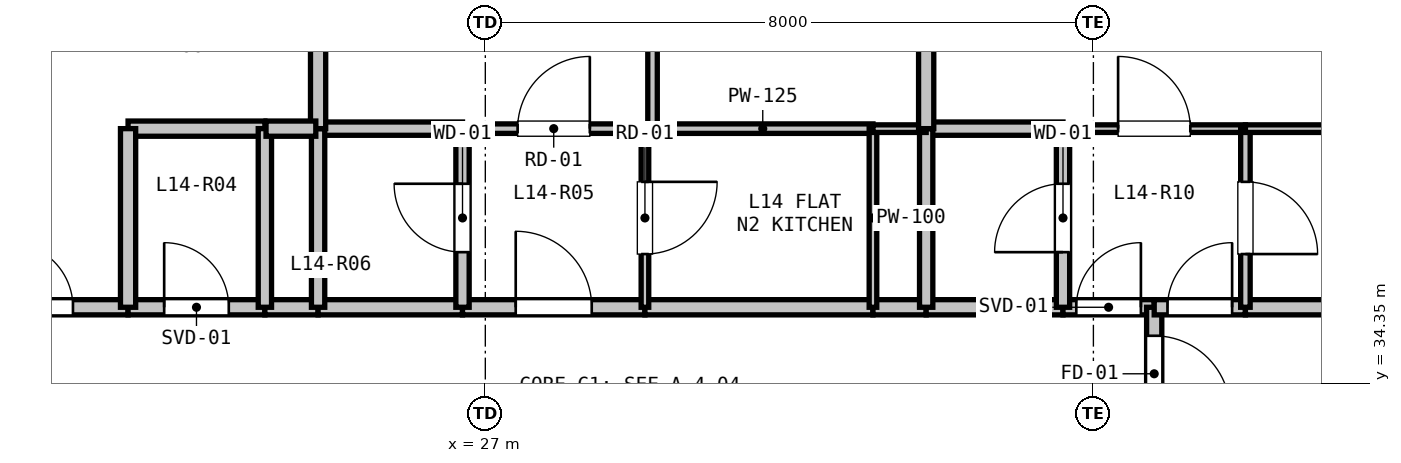
"""IFC4 building model, lengths in metres.
Left out: names, types, materials, properties, quantities, classifications, styles, units other than length and angle.
Written with IfcOpenShell. Run it as: python <this file> out.ifc"""

import sys

from ifc_helpers import new_model, si_unit, direction, frame, frame_2d, origin, place, context, subcontext, project, spatial, rectangle, extrude, element, fill, save


model = new_model("IFC4")
c1 = context("Model", 3, precision=1e-05, world=origin(), true_north=direction((0.0, 1.0)))
c2 = subcontext(c1, "Body", "Model", "MODEL_VIEW")
j1 = project(units=[si_unit("LENGTHUNIT", "METRE"), si_unit("PLANEANGLEUNIT", "RADIAN")], contexts=[c1])
p1 = place(None, origin())
s1 = spatial("IfcSite", under=j1, at=p1, CompositionType="ELEMENT")
p2 = place(p1, origin())
s2 = spatial("IfcBuilding", under=s1, at=p2, CompositionType="ELEMENT")
p3 = place(p2, frame((0.0, 0.0, 52.2)))
s3 = spatial("IfcBuildingStorey", under=s2, at=p3, CompositionType="ELEMENT", Elevation=52.2)
p4 = place(p3, frame((16.39, 36.617, 0.0), z_axis=(0.0, 0.0, 1.0), x_axis=(0.866027351828, 0.499996625875, 0.0)))
e1 = element("IfcWall", 1, at=p4, inside=s3, PredefinedType="PARAPET", context=c2, shape_type="SweptSolid", body=[
    extrude(rectangle(XDim=11.973, YDim=0.2, at=frame_2d((5.987, 0.0))), origin(), (0.0, 0.0, 1.0), 0.2),
])
p5 = place(p3, frame((20.0, 35.35, 0.0), z_axis=(0.0, 0.0, 1.0), x_axis=(1.0, 0.0, 0.0)))
e2 = element("IfcWall", 2, at=p5, inside=s3, PredefinedType="PARTITIONING", context=c2, shape_type="SweptSolid", body=[
    extrude(rectangle(XDim=2.3, YDim=0.2, at=frame_2d((1.15, 0.0))), origin(), (0.0, 0.0, 1.0), 3.04),
])
p6 = place(p5, frame((0.725, 0.0, 0.0)))
e3 = element("IfcOpeningElement", 3, at=p6, cuts=e2, PredefinedType="OPENING", context=c2, shape_type="SweptSolid", body=[
    extrude(rectangle(XDim=0.85, YDim=2.1, at=frame_2d((0.425, 1.05))), frame((0.0, 0.11, 0.0), z_axis=(0.0, -1.0, 0.0), x_axis=(1.0, 0.0, 0.0)), (0.0, 0.0, 1.0), 0.22),
])
p7 = place(p3, frame((22.3, 35.35, 0.0), z_axis=(0.0, 0.0, 1.0), x_axis=(1.0, 0.0, 0.0)))
e4 = element("IfcWall", 4, at=p7, inside=s3, PredefinedType="PARTITIONING", context=c2, shape_type="SweptSolid", body=[
    extrude(rectangle(XDim=1.8, YDim=0.2, at=frame_2d((0.9, 0.0))), origin(), (0.0, 0.0, 1.0), 3.04),
])
p8 = place(p7, frame((0.475, 0.0, 0.0)))
e5 = element("IfcOpeningElement", 5, at=p8, cuts=e4, PredefinedType="OPENING", context=c2, shape_type="SweptSolid", body=[
    extrude(rectangle(XDim=0.85, YDim=2.1, at=frame_2d((0.425, 1.05))), frame((0.0, 0.11, 0.0), z_axis=(0.0, -1.0, 0.0), x_axis=(1.0, 0.0, 0.0)), (0.0, 0.0, 1.0), 0.22),
])
p9 = place(p3, frame((24.1, 35.35, 0.0), z_axis=(0.0, 0.0, 1.0), x_axis=(1.0, 0.0, 0.0)))
e6 = element("IfcWall", 6, at=p9, inside=s3, PredefinedType="PARTITIONING", context=c2, shape_type="SweptSolid", body=[
    extrude(rectangle(XDim=0.7, YDim=0.2, at=frame_2d((0.35, 0.0))), origin(), (0.0, 0.0, 1.0), 3.04),
])
p10 = place(p3, frame((24.8, 35.35, 0.0), z_axis=(0.0, 0.0, 1.0), x_axis=(1.0, 0.0, 0.0)))
e7 = element("IfcWall", 7, at=p10, inside=s3, PredefinedType="PARTITIONING", context=c2, shape_type="SweptSolid", body=[
    extrude(rectangle(XDim=1.9, YDim=0.2, at=frame_2d((0.95, 0.0))), origin(), (0.0, 0.0, 1.0), 3.04),
])
p11 = place(p3, frame((26.7, 35.35, 0.0), z_axis=(0.0, 0.0, 1.0), x_axis=(1.0, 0.0, 0.0)))
e8 = element("IfcWall", 8, at=p11, inside=s3, PredefinedType="PARTITIONING", context=c2, shape_type="SweptSolid", body=[
    extrude(rectangle(XDim=2.4, YDim=0.2, at=frame_2d((1.2, 0.0))), origin(), (0.0, 0.0, 1.0), 3.04),
])
p12 = place(p11, frame((0.7, 0.0, 0.0)))
e9 = element("IfcOpeningElement", 9, at=p12, cuts=e8, PredefinedType="OPENING", context=c2, shape_type="SweptSolid", body=[
    extrude(rectangle(XDim=1.0, YDim=2.15, at=frame_2d((0.5, 1.075))), frame((0.0, 0.11, 0.0), z_axis=(0.0, -1.0, 0.0), x_axis=(1.0, 0.0, 0.0)), (0.0, 0.0, 1.0), 0.22),
])
p13 = place(p3, frame((29.1, 35.35, 0.0), z_axis=(0.0, 0.0, 1.0), x_axis=(1.0, 0.0, 0.0)))
e10 = element("IfcWall", 10, at=p13, inside=s3, PredefinedType="PARTITIONING", context=c2, shape_type="SweptSolid", body=[
    extrude(rectangle(XDim=3.0, YDim=0.2, at=frame_2d((1.5, 0.0))), origin(), (0.0, 0.0, 1.0), 3.04),
])
p14 = place(p3, frame((32.1, 35.35, 0.0), z_axis=(0.0, 0.0, 1.0), x_axis=(1.0, 0.0, 0.0)))
e11 = element("IfcWall", 11, at=p14, inside=s3, PredefinedType="PARTITIONING", context=c2, shape_type="SweptSolid", body=[
    extrude(rectangle(XDim=0.7, YDim=0.2, at=frame_2d((0.35, 0.0))), origin(), (0.0, 0.0, 1.0), 3.04),
])
p15 = place(p3, frame((32.8, 35.35, 0.0), z_axis=(0.0, 0.0, 1.0), x_axis=(1.0, 0.0, 0.0)))
e12 = element("IfcWall", 12, at=p15, inside=s3, PredefinedType="PARTITIONING", context=c2, shape_type="SweptSolid", body=[
    extrude(rectangle(XDim=1.8, YDim=0.2, at=frame_2d((0.9, 0.0))), origin(), (0.0, 0.0, 1.0), 3.04),
])
p16 = place(p3, frame((34.6, 35.35, 0.0), z_axis=(0.0, 0.0, 1.0), x_axis=(1.0, 0.0, 0.0)))
e13 = element("IfcWall", 13, at=p16, inside=s3, PredefinedType="PARTITIONING", context=c2, shape_type="SweptSolid", body=[
    extrude(rectangle(XDim=1.2, YDim=0.2, at=frame_2d((0.6, 0.0))), origin(), (0.0, 0.0, 1.0), 3.04),
])
p17 = place(p16, frame((0.175, 0.0, 0.0)))
e14 = element("IfcOpeningElement", 14, at=p17, cuts=e13, PredefinedType="OPENING", context=c2, shape_type="SweptSolid", body=[
    extrude(rectangle(XDim=0.85, YDim=2.1, at=frame_2d((0.425, 1.05))), frame((0.0, 0.11, 0.0), z_axis=(0.0, -1.0, 0.0), x_axis=(1.0, 0.0, 0.0)), (0.0, 0.0, 1.0), 0.22),
])
p18 = place(p3, frame((35.8, 35.35, 0.0), z_axis=(0.0, 0.0, 1.0), x_axis=(0.0, -1.0, 0.0)))
e15 = element("IfcWall", 15, at=p18, inside=s3, PredefinedType="PARTITIONING", context=c2, shape_type="SweptSolid", body=[
    extrude(rectangle(XDim=1.75, YDim=0.2, at=frame_2d((0.875, 0.0))), origin(), (0.0, 0.0, 1.0), 3.04),
])
p19 = place(p18, frame((0.375, 0.0, 0.0)))
e16 = element("IfcOpeningElement", 16, at=p19, cuts=e15, PredefinedType="OPENING", context=c2, shape_type="SweptSolid", body=[
    extrude(rectangle(XDim=1.0, YDim=2.15, at=frame_2d((0.5, 1.075))), frame((0.0, 0.11, 0.0), z_axis=(0.0, -1.0, 0.0), x_axis=(1.0, 0.0, 0.0)), (0.0, 0.0, 1.0), 0.22),
])
p20 = place(p3, frame((35.8, 35.35, 0.0), z_axis=(0.0, 0.0, 1.0), x_axis=(1.0, 0.0, 0.0)))
e17 = element("IfcWall", 17, at=p20, inside=s3, PredefinedType="PARTITIONING", context=c2, shape_type="SweptSolid", body=[
    extrude(rectangle(XDim=1.2, YDim=0.2, at=frame_2d((0.6, 0.0))), origin(), (0.0, 0.0, 1.0), 2.338),
])
p21 = place(p20, frame((0.175, 0.0, 0.0)))
e18 = element("IfcOpeningElement", 18, at=p21, cuts=e17, PredefinedType="OPENING", context=c2, shape_type="SweptSolid", body=[
    extrude(rectangle(XDim=0.85, YDim=2.1, at=frame_2d((0.425, 1.05))), frame((0.0, 0.11, 0.0), z_axis=(0.0, -1.0, 0.0), x_axis=(1.0, 0.0, 0.0)), (0.0, 0.0, 1.0), 0.22),
])
p22 = place(p3, frame((37.0, 35.35, 0.0), z_axis=(0.0, 0.0, 1.0), x_axis=(1.0, 0.0, 0.0)))
e19 = element("IfcWall", 19, at=p22, inside=s3, PredefinedType="PARTITIONING", context=c2, shape_type="SweptSolid", body=[
    extrude(rectangle(XDim=1.4, YDim=0.2, at=frame_2d((0.7, 0.0))), origin(), (0.0, 0.0, 1.0), 2.338),
])
p23 = place(p3, frame((26.7, 37.7, 0.0), z_axis=(0.0, 0.0, 1.0), x_axis=(1.0, 0.0, 0.0)))
e20 = element("IfcWall", 20, at=p23, inside=s3, PredefinedType="PARTITIONING", context=c2, shape_type="SweptSolid", body=[
    extrude(rectangle(XDim=2.4, YDim=0.125, at=frame_2d((1.2, 0.0))), origin(), (0.0, 0.0, 1.0), 3.04),
])
p24 = place(p23, frame((0.725, 0.0, 0.0)))
e21 = element("IfcOpeningElement", 21, at=p24, cuts=e20, PredefinedType="OPENING", context=c2, shape_type="SweptSolid", body=[
    extrude(rectangle(XDim=0.95, YDim=2.1, at=frame_2d((0.475, 1.05))), frame((0.0, 0.073, 0.0), z_axis=(0.0, -1.0, 0.0), x_axis=(1.0, 0.0, 0.0)), (0.0, 0.0, 1.0), 0.145),
])
p25 = place(p3, frame((29.1, 37.7, 0.0), z_axis=(0.0, 0.0, 1.0), x_axis=(0.0, -1.0, 0.0)))
e22 = element("IfcWall", 22, at=p25, inside=s3, PredefinedType="PARTITIONING", context=c2, shape_type="SweptSolid", body=[
    extrude(rectangle(XDim=2.35, YDim=0.1, at=frame_2d((1.175, 0.0))), origin(), (0.0, 0.0, 1.0), 3.04),
])
p26 = place(p25, frame((0.7, 0.0, 0.0)))
e23 = element("IfcOpeningElement", 23, at=p26, cuts=e22, PredefinedType="OPENING", context=c2, shape_type="SweptSolid", body=[
    extrude(rectangle(XDim=0.95, YDim=2.1, at=frame_2d((0.475, 1.05))), frame((0.0, 0.06, 0.0), z_axis=(0.0, -1.0, 0.0), x_axis=(1.0, 0.0, 0.0)), (0.0, 0.0, 1.0), 0.12),
])
p27 = place(p3, frame((26.7, 35.35, 0.0), z_axis=(0.0, 0.0, 1.0), x_axis=(0.0, 1.0, 0.0)))
e24 = element("IfcWall", 24, at=p27, inside=s3, PredefinedType="PLUMBINGWALL", context=c2, shape_type="SweptSolid", body=[
    extrude(rectangle(XDim=2.35, YDim=0.175, at=frame_2d((1.175, 0.0))), origin(), (0.0, 0.0, 1.0), 3.04),
])
p28 = place(p27, frame((0.725, 0.0, 0.0)))
e25 = element("IfcOpeningElement", 25, at=p28, cuts=e24, PredefinedType="OPENING", context=c2, shape_type="SweptSolid", body=[
    extrude(rectangle(XDim=0.9, YDim=2.1, at=frame_2d((0.45, 1.05))), frame((0.0, 0.097, 0.0), z_axis=(0.0, -1.0, 0.0), x_axis=(1.0, 0.0, 0.0)), (0.0, 0.0, 1.0), 0.195),
])
p29 = place(p3, frame((34.6, 37.7, 0.0), z_axis=(0.0, 0.0, 1.0), x_axis=(1.0, 0.0, 0.0)))
e26 = element("IfcWall", 26, at=p29, inside=s3, PredefinedType="PARTITIONING", context=c2, shape_type="SweptSolid", body=[
    extrude(rectangle(XDim=2.4, YDim=0.1, at=frame_2d((1.2, 0.0))), origin(), (0.0, 0.0, 1.0), 2.338),
])
p30 = place(p29, frame((0.725, 0.0, 0.0)))
e27 = element("IfcOpeningElement", 27, at=p30, cuts=e26, PredefinedType="OPENING", context=c2, shape_type="SweptSolid", body=[
    extrude(rectangle(XDim=0.95, YDim=2.1, at=frame_2d((0.475, 1.05))), frame((0.0, 0.06, 0.0), z_axis=(0.0, -1.0, 0.0), x_axis=(1.0, 0.0, 0.0)), (0.0, 0.0, 1.0), 0.12),
])
p31 = place(p3, frame((37.0, 37.7, 0.0), z_axis=(0.0, 0.0, 1.0), x_axis=(0.0, -1.0, 0.0)))
e28 = element("IfcWall", 28, at=p31, inside=s3, PredefinedType="PARTITIONING", context=c2, shape_type="SweptSolid", body=[
    extrude(rectangle(XDim=2.35, YDim=0.125, at=frame_2d((1.175, 0.0))), origin(), (0.0, 0.0, 1.0), 2.338),
])
p32 = place(p31, frame((0.7, 0.0, 0.0)))
e29 = element("IfcOpeningElement", 29, at=p32, cuts=e28, PredefinedType="OPENING", context=c2, shape_type="SweptSolid", body=[
    extrude(rectangle(XDim=0.95, YDim=2.1, at=frame_2d((0.475, 1.05))), frame((0.0, 0.073, 0.0), z_axis=(0.0, -1.0, 0.0), x_axis=(1.0, 0.0, 0.0)), (0.0, 0.0, 1.0), 0.145),
])
p33 = place(p3, frame((34.6, 35.35, 0.0), z_axis=(0.0, 0.0, 1.0), x_axis=(0.0, 1.0, 0.0)))
e30 = element("IfcWall", 30, at=p33, inside=s3, PredefinedType="PLUMBINGWALL", context=c2, shape_type="SweptSolid", body=[
    extrude(rectangle(XDim=2.35, YDim=0.175, at=frame_2d((1.175, 0.0))), origin(), (0.0, 0.0, 1.0), 3.04),
])
p34 = place(p33, frame((0.725, 0.0, 0.0)))
e31 = element("IfcOpeningElement", 31, at=p34, cuts=e30, PredefinedType="OPENING", context=c2, shape_type="SweptSolid", body=[
    extrude(rectangle(XDim=0.9, YDim=2.1, at=frame_2d((0.45, 1.05))), frame((0.0, 0.097, 0.0), z_axis=(0.0, -1.0, 0.0), x_axis=(1.0, 0.0, 0.0)), (0.0, 0.0, 1.0), 0.195),
])
p35 = place(p3, frame((22.3, 37.7, 0.0), z_axis=(0.0, 0.0, 1.0), x_axis=(1.0, 0.0, 0.0)))
e32 = element("IfcWall", 32, at=p35, inside=s3, PredefinedType="PARTITIONING", context=c2, shape_type="SweptSolid", body=[
    extrude(rectangle(XDim=1.8, YDim=0.2, at=frame_2d((0.9, 0.0))), origin(), (0.0, 0.0, 1.0), 3.04),
])
p36 = place(p3, frame((24.1, 37.7, 0.0), z_axis=(0.0, 0.0, 1.0), x_axis=(0.0, -1.0, 0.0)))
e33 = element("IfcWall", 33, at=p36, inside=s3, PredefinedType="PLUMBINGWALL", context=c2, shape_type="SweptSolid", body=[
    extrude(rectangle(XDim=2.35, YDim=0.175, at=frame_2d((1.175, 0.0))), origin(), (0.0, 0.0, 1.0), 3.04),
])
p37 = place(p3, frame((22.3, 35.35, 0.0), z_axis=(0.0, 0.0, 1.0), x_axis=(0.0, 1.0, 0.0)))
e34 = element("IfcWall", 34, at=p37, inside=s3, PredefinedType="PARTITIONING", context=c2, shape_type="SweptSolid", body=[
    extrude(rectangle(XDim=2.35, YDim=0.2, at=frame_2d((1.175, 0.0))), origin(), (0.0, 0.0, 1.0), 3.04),
])
p38 = place(p3, frame((24.8, 37.7, 0.0), z_axis=(0.0, 0.0, 1.0), x_axis=(1.0, 0.0, 0.0)))
e35 = element("IfcWall", 35, at=p38, inside=s3, PredefinedType="PLUMBINGWALL", context=c2, shape_type="SweptSolid", body=[
    extrude(rectangle(XDim=1.9, YDim=0.175, at=frame_2d((0.95, 0.0))), origin(), (0.0, 0.0, 1.0), 3.04),
])
p39 = place(p3, frame((24.8, 35.35, 0.0), z_axis=(0.0, 0.0, 1.0), x_axis=(0.0, 1.0, 0.0)))
e36 = element("IfcWall", 36, at=p39, inside=s3, PredefinedType="PLUMBINGWALL", context=c2, shape_type="SweptSolid", body=[
    extrude(rectangle(XDim=2.35, YDim=0.175, at=frame_2d((1.175, 0.0))), origin(), (0.0, 0.0, 1.0), 3.04),
])
p40 = place(p3, frame((29.2, 37.7, 0.0), z_axis=(0.0, 0.0, 1.0), x_axis=(1.0, 0.0, 0.0)))
e37 = element("IfcWall", 37, at=p40, inside=s3, PredefinedType="PARTITIONING", context=c2, shape_type="SweptSolid", body=[
    extrude(rectangle(XDim=2.9, YDim=0.125, at=frame_2d((1.45, 0.0))), origin(), (0.0, 0.0, 1.0), 3.04),
])
p41 = place(p3, frame((32.1, 37.7, 0.0), z_axis=(0.0, 0.0, 1.0), x_axis=(0.0, -1.0, 0.0)))
e38 = element("IfcWall", 38, at=p41, inside=s3, PredefinedType="PARTITIONING", context=c2, shape_type="SweptSolid", body=[
    extrude(rectangle(XDim=2.35, YDim=0.1, at=frame_2d((1.175, 0.0))), origin(), (0.0, 0.0, 1.0), 3.04),
])
p42 = place(p3, frame((32.8, 37.7, 0.0), z_axis=(0.0, 0.0, 1.0), x_axis=(1.0, 0.0, 0.0)))
e39 = element("IfcWall", 39, at=p42, inside=s3, PredefinedType="PLUMBINGWALL", context=c2, shape_type="SweptSolid", body=[
    extrude(rectangle(XDim=1.8, YDim=0.175, at=frame_2d((0.9, 0.0))), origin(), (0.0, 0.0, 1.0), 3.04),
])
p43 = place(p3, frame((32.8, 35.35, 0.0), z_axis=(0.0, 0.0, 1.0), x_axis=(0.0, 1.0, 0.0)))
e40 = element("IfcWall", 40, at=p43, inside=s3, PredefinedType="PLUMBINGWALL", context=c2, shape_type="SweptSolid", body=[
    extrude(rectangle(XDim=2.35, YDim=0.175, at=frame_2d((1.175, 0.0))), origin(), (0.0, 0.0, 1.0), 3.04),
])
p44 = place(p3, frame((37.0, 37.7, 0.0), z_axis=(0.0, 0.0, 1.0), x_axis=(1.0, 0.0, 0.0)))
e41 = element("IfcWall", 41, at=p44, inside=s3, PredefinedType="PARTITIONING", context=c2, shape_type="SweptSolid", body=[
    extrude(rectangle(XDim=6.688, YDim=0.1, at=frame_2d((3.344, 0.0))), origin(), (0.0, 0.0, 1.0), 2.338),
])
p45 = place(p44, frame((2.869, 0.0, 0.0)))
e42 = element("IfcOpeningElement", 42, at=p45, cuts=e41, PredefinedType="OPENING", context=c2, shape_type="SweptSolid", body=[
    extrude(rectangle(XDim=0.95, YDim=2.1, at=frame_2d((0.475, 1.05))), frame((0.0, 0.06, 0.0), z_axis=(0.0, -1.0, 0.0), x_axis=(1.0, 0.0, 0.0)), (0.0, 0.0, 1.0), 0.12),
])
p46 = place(p3, frame((24.8, 41.431, 0.0), z_axis=(0.0, 0.0, 1.0), x_axis=(0.0, -1.0, 0.0)))
e43 = element("IfcWall", 43, at=p46, inside=s3, PredefinedType="PARTITIONING", context=c2, shape_type="SweptSolid", body=[
    extrude(rectangle(XDim=3.731, YDim=0.2, at=frame_2d((1.865, 0.0))), origin(), (0.0, 0.0, 1.0), 2.365),
])
p47 = place(p3, frame((24.77, 37.7, 0.0), z_axis=(0.0, 0.0, 1.0), x_axis=(-1.0, 0.0, 0.0)))
e44 = element("IfcWall", 44, at=p47, inside=s3, PredefinedType="PARTITIONING", context=c2, shape_type="SweptSolid", body=[
    extrude(rectangle(XDim=0.655, YDim=0.2, at=frame_2d((0.328, 0.0))), origin(), (0.0, 0.0, 1.0), 3.04),
])
p48 = place(p3, frame((29.2, 43.826, 0.0), z_axis=(0.0, 0.0, 1.0), x_axis=(0.0, -1.0, 0.0)))
e45 = element("IfcWall", 45, at=p48, inside=s3, PredefinedType="PARTITIONING", context=c2, shape_type="SweptSolid", body=[
    extrude(rectangle(XDim=6.126, YDim=0.125, at=frame_2d((3.063, 0.0))), origin(), (0.0, 0.0, 1.0), 2.365),
])
p49 = place(p48, frame((2.588, 0.0, 0.0)))
e46 = element("IfcOpeningElement", 46, at=p49, cuts=e45, PredefinedType="OPENING", context=c2, shape_type="SweptSolid", body=[
    extrude(rectangle(XDim=0.95, YDim=2.1, at=frame_2d((0.475, 1.05))), frame((0.0, 0.073, 0.0), z_axis=(0.0, -1.0, 0.0), x_axis=(1.0, 0.0, 0.0)), (0.0, 0.0, 1.0), 0.145),
])
p50 = place(p3, frame((32.8, 37.7, 0.0), z_axis=(0.0, 0.0, 1.0), x_axis=(-1.0, 0.0, 0.0)))
e47 = element("IfcWall", 47, at=p50, inside=s3, PredefinedType="PARTITIONING", context=c2, shape_type="SweptSolid", body=[
    extrude(rectangle(XDim=0.7, YDim=0.1, at=frame_2d((0.35, 0.0))), origin(), (0.0, 0.0, 1.0), 3.04),
])
p51 = place(p3, frame((32.8, 45.905, 0.0), z_axis=(0.0, 0.0, 1.0), x_axis=(0.0, -1.0, 0.0)))
e48 = element("IfcWall", 48, at=p51, inside=s3, PredefinedType="PARTITIONING", context=c2, shape_type="SweptSolid", body=[
    extrude(rectangle(XDim=8.205, YDim=0.2, at=frame_2d((4.103, 0.0))), origin(), (0.0, 0.0, 1.0), 2.365),
])
p52 = place(p19, origin())
e49 = element("IfcDoor", 49, at=p52, inside=s3, OperationType="SINGLE_SWING_RIGHT", PredefinedType="DOOR", context=c2, shape_type="SweptSolid", body=[
    extrude(rectangle(XDim=1.0, YDim=2.15, at=frame_2d((0.5, 1.075))), frame((0.0, 0.025, 0.0), z_axis=(0.0, -1.0, 0.0), x_axis=(1.0, 0.0, 0.0)), (0.0, 0.0, 1.0), 0.05),
])
fill(e16, e49)
p53 = place(p12, origin())
e50 = element("IfcDoor", 50, at=p53, inside=s3, OperationType="SINGLE_SWING_LEFT", PredefinedType="DOOR", context=c2, shape_type="SweptSolid", body=[
    extrude(rectangle(XDim=1.0, YDim=2.15, at=frame_2d((0.5, 1.075))), frame((0.0, 0.025, 0.0), z_axis=(0.0, -1.0, 0.0), x_axis=(1.0, 0.0, 0.0)), (0.0, 0.0, 1.0), 0.05),
])
fill(e9, e50)
p54 = place(p17, origin())
e51 = element("IfcDoor", 51, at=p54, inside=s3, OperationType="SINGLE_SWING_RIGHT", PredefinedType="DOOR", context=c2, shape_type="SweptSolid", body=[
    extrude(rectangle(XDim=0.85, YDim=2.1, at=frame_2d((0.425, 1.05))), frame((0.0, 0.025, 0.0), z_axis=(0.0, -1.0, 0.0), x_axis=(1.0, 0.0, 0.0)), (0.0, 0.0, 1.0), 0.05),
])
fill(e14, e51)
p55 = place(p8, origin())
e52 = element("IfcDoor", 52, at=p55, inside=s3, OperationType="SINGLE_SWING_LEFT", PredefinedType="DOOR", context=c2, shape_type="SweptSolid", body=[
    extrude(rectangle(XDim=0.85, YDim=2.1, at=frame_2d((0.425, 1.05))), frame((0.0, 0.025, 0.0), z_axis=(0.0, -1.0, 0.0), x_axis=(1.0, 0.0, 0.0)), (0.0, 0.0, 1.0), 0.05),
])
fill(e5, e52)
p56 = place(p6, origin())
e53 = element("IfcDoor", 53, at=p56, inside=s3, OperationType="SINGLE_SWING_LEFT", PredefinedType="DOOR", context=c2, shape_type="SweptSolid", body=[
    extrude(rectangle(XDim=0.85, YDim=2.1, at=frame_2d((0.425, 1.05))), frame((0.0, 0.025, 0.0), z_axis=(0.0, -1.0, 0.0), x_axis=(1.0, 0.0, 0.0)), (0.0, 0.0, 1.0), 0.05),
])
fill(e3, e53)
p57 = place(p21, origin())
e54 = element("IfcDoor", 54, at=p57, inside=s3, OperationType="SINGLE_SWING_RIGHT", PredefinedType="DOOR", context=c2, shape_type="SweptSolid", body=[
    extrude(rectangle(XDim=0.85, YDim=2.1, at=frame_2d((0.425, 1.05))), frame((0.0, 0.025, 0.0), z_axis=(0.0, -1.0, 0.0), x_axis=(1.0, 0.0, 0.0)), (0.0, 0.0, 1.0), 0.05),
])
fill(e18, e54)
p58 = place(p28, origin())
e55 = element("IfcDoor", 55, at=p58, inside=s3, OperationType="SINGLE_SWING_RIGHT", PredefinedType="DOOR", context=c2, shape_type="SweptSolid", body=[
    extrude(rectangle(XDim=0.9, YDim=2.1, at=frame_2d((0.45, 1.05))), frame((0.0, 0.025, 0.0), z_axis=(0.0, -1.0, 0.0), x_axis=(1.0, 0.0, 0.0)), (0.0, 0.0, 1.0), 0.05),
])
fill(e25, e55)
p59 = place(p26, origin())
e56 = element("IfcDoor", 56, at=p59, inside=s3, OperationType="SINGLE_SWING_LEFT", PredefinedType="DOOR", context=c2, shape_type="SweptSolid", body=[
    extrude(rectangle(XDim=0.95, YDim=2.1, at=frame_2d((0.475, 1.05))), frame((0.0, 0.025, 0.0), z_axis=(0.0, -1.0, 0.0), x_axis=(1.0, 0.0, 0.0)), (0.0, 0.0, 1.0), 0.05),
])
fill(e23, e56)
p60 = place(p24, origin())
e57 = element("IfcDoor", 57, at=p60, inside=s3, OperationType="SINGLE_SWING_RIGHT", PredefinedType="DOOR", context=c2, shape_type="SweptSolid", body=[
    extrude(rectangle(XDim=0.95, YDim=2.1, at=frame_2d((0.475, 1.05))), frame((0.0, 0.025, 0.0), z_axis=(0.0, -1.0, 0.0), x_axis=(1.0, 0.0, 0.0)), (0.0, 0.0, 1.0), 0.05),
])
fill(e21, e57)
p61 = place(p34, origin())
e58 = element("IfcDoor", 58, at=p61, inside=s3, OperationType="SINGLE_SWING_LEFT", PredefinedType="DOOR", context=c2, shape_type="SweptSolid", body=[
    extrude(rectangle(XDim=0.9, YDim=2.1, at=frame_2d((0.45, 1.05))), frame((0.0, 0.025, 0.0), z_axis=(0.0, -1.0, 0.0), x_axis=(1.0, 0.0, 0.0)), (0.0, 0.0, 1.0), 0.05),
])
fill(e31, e58)
p62 = place(p32, origin())
e59 = element("IfcDoor", 59, at=p62, inside=s3, OperationType="SINGLE_SWING_RIGHT", PredefinedType="DOOR", context=c2, shape_type="SweptSolid", body=[
    extrude(rectangle(XDim=0.95, YDim=2.1, at=frame_2d((0.475, 1.05))), frame((0.0, 0.025, 0.0), z_axis=(0.0, -1.0, 0.0), x_axis=(1.0, 0.0, 0.0)), (0.0, 0.0, 1.0), 0.05),
])
fill(e29, e59)
p63 = place(p30, origin())
e60 = element("IfcDoor", 60, at=p63, inside=s3, OperationType="SINGLE_SWING_LEFT", PredefinedType="DOOR", context=c2, shape_type="SweptSolid", body=[
    extrude(rectangle(XDim=0.95, YDim=2.1, at=frame_2d((0.475, 1.05))), frame((0.0, 0.025, 0.0), z_axis=(0.0, -1.0, 0.0), x_axis=(1.0, 0.0, 0.0)), (0.0, 0.0, 1.0), 0.05),
])
fill(e27, e60)
save(model, sys.argv[1])
